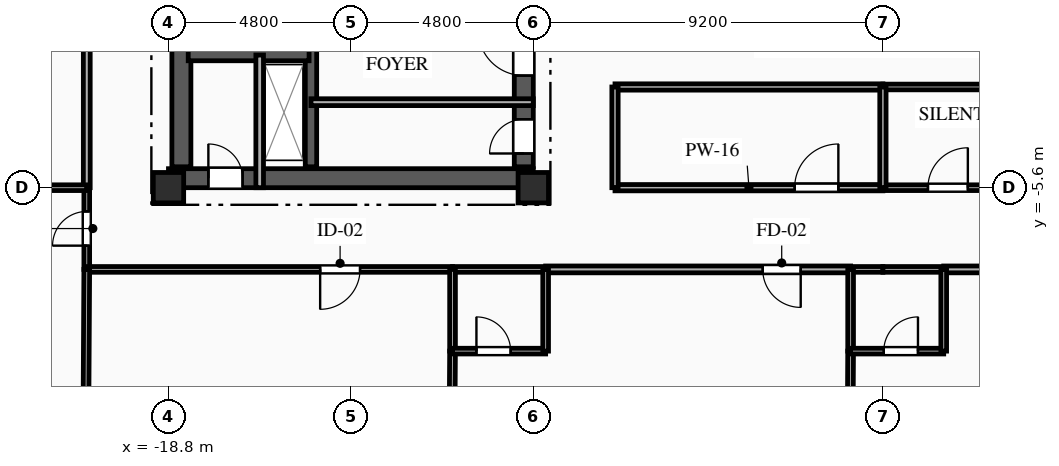
"""IFC4 building model, lengths in metres.
Left out: names, types, materials, properties, quantities, classifications, styles, units other than length and angle.
Written with IfcOpenShell. Run it as: python <this file> out.ifc"""

import sys

from ifc_helpers import new_model, si_unit, direction, frame, frame_2d, origin, origin_2d, place, context, subcontext, project, spatial, rectangle, extrude, element, fill, save


model = new_model("IFC4")
c1 = context("Model", 3, precision=1e-05, world=origin(), true_north=direction((0.0, 1.0)))
c2 = subcontext(c1, "Body", "Model", "MODEL_VIEW")
j1 = project(units=[si_unit("LENGTHUNIT", "METRE"), si_unit("PLANEANGLEUNIT", "RADIAN")], contexts=[c1])
p1 = place(None, origin())
s1 = spatial("IfcSite", under=j1, at=p1, CompositionType="ELEMENT")
p2 = place(p1, origin())
s2 = spatial("IfcBuilding", under=s1, at=p2, CompositionType="ELEMENT")
p3 = place(p2, frame((0.0, 0.0, 189.7)))
s3 = spatial("IfcBuildingStorey", under=s2, at=p3, CompositionType="ELEMENT", Elevation=189.7)
for number, where, z_axis, x_axis in (
    (1, (-18.8, -5.6, 0.0), (0.0, 0.0, 1.0), (1.0, 0.0, 0.0)),
    (2, (-9.2, -5.6, 0.0), (0.0, 0.0, 1.0), (1.0, 0.0, 0.0)),
):
    element("IfcColumn", number, at=place(p3, frame(where, z_axis=z_axis, x_axis=x_axis)), inside=s3, PredefinedType="COLUMN", context=c2, shape_type="SweptSolid", body=[
        extrude(rectangle(XDim=0.8, YDim=0.8, at=origin_2d()), origin(), (0.0, 0.0, 1.0), 3.35),
    ])
p4 = place(p3, frame((-18.8, -5.35, 0.0), z_axis=(0.0, 0.0, 1.0), x_axis=(1.0, 0.0, 0.0)))
e3 = element("IfcWall", 3, at=p4, inside=s3, PredefinedType="SHEAR", context=c2, shape_type="SweptSolid", body=[
    extrude(rectangle(XDim=9.6, YDim=0.5, at=frame_2d((4.8, 0.0))), origin(), (0.0, 0.0, 1.0), 3.04),
])
p5 = place(p4, frame((1.05, 0.0, 0.0)))
e4 = element("IfcOpeningElement", 4, at=p5, cuts=e3, PredefinedType="OPENING", context=c2, shape_type="SweptSolid", body=[
    extrude(rectangle(XDim=0.9, YDim=2.1, at=frame_2d((0.45, 1.05))), frame((0.0, 0.26, 0.0), z_axis=(0.0, -1.0, 0.0), x_axis=(1.0, 0.0, 0.0)), (0.0, 0.0, 1.0), 0.52),
])
p6 = place(p3, frame((-18.46, -5.05, 0.0), z_axis=(0.0, 0.0, 1.0), x_axis=(0.0, 1.0, 0.0)))
e5 = element("IfcWall", 5, at=p6, inside=s3, PredefinedType="SHEAR", context=c2, shape_type="SweptSolid", body=[
    extrude(rectangle(XDim=10.1, YDim=0.5, at=frame_2d((5.05, 0.0))), origin(), (0.0, 0.0, 1.0), 3.04),
])
p7 = place(p3, frame((-9.45, -5.05, 0.0), z_axis=(0.0, 0.0, 1.0), x_axis=(0.0, 1.0, 0.0)))
e6 = element("IfcWall", 6, at=p7, inside=s3, PredefinedType="SHEAR", context=c2, shape_type="SweptSolid", body=[
    extrude(rectangle(XDim=10.1, YDim=0.5, at=frame_2d((5.05, 0.0))), origin(), (0.0, 0.0, 1.0), 3.04),
])
p8 = place(p7, frame((7.175, 0.0, 0.0)))
e7 = element("IfcOpeningElement", 7, at=p8, cuts=e6, PredefinedType="OPENING", context=c2, shape_type="SweptSolid", body=[
    extrude(rectangle(XDim=0.9, YDim=2.1, at=frame_2d((0.45, 1.05))), frame((0.0, 0.26, 0.0), z_axis=(0.0, -1.0, 0.0), x_axis=(1.0, 0.0, 0.0)), (0.0, 0.0, 1.0), 0.52),
])
p9 = place(p7, frame((2.4, 0.0, 0.0)))
e8 = element("IfcOpeningElement", 8, at=p9, cuts=e6, PredefinedType="OPENING", context=c2, shape_type="SweptSolid", body=[
    extrude(rectangle(XDim=1.2, YDim=2.15, at=frame_2d((0.6, 1.075))), frame((0.0, 0.26, 0.0), z_axis=(0.0, -1.0, 0.0), x_axis=(1.0, 0.0, 0.0)), (0.0, 0.0, 1.0), 0.52),
])
p10 = place(p7, frame((0.35, 0.0, 0.0)))
e9 = element("IfcOpeningElement", 9, at=p10, cuts=e6, PredefinedType="OPENING", context=c2, shape_type="SweptSolid", body=[
    extrude(rectangle(XDim=0.9, YDim=2.1, at=frame_2d((0.45, 1.05))), frame((0.0, 0.26, 0.0), z_axis=(0.0, -1.0, 0.0), x_axis=(1.0, 0.0, 0.0)), (0.0, 0.0, 1.0), 0.52),
])
p11 = place(p7, frame((5.0, 0.0, 0.0)))
e10 = element("IfcOpeningElement", 10, at=p11, cuts=e6, PredefinedType="OPENING", context=c2, shape_type="SweptSolid", body=[
    extrude(rectangle(XDim=0.9, YDim=2.1, at=frame_2d((0.45, 1.05))), frame((0.0, 0.26, 0.0), z_axis=(0.0, -1.0, 0.0), x_axis=(1.0, 0.0, 0.0)), (0.0, 0.0, 1.0), 0.52),
])
p12 = place(p3, frame((-15.05, -5.05, 0.0), z_axis=(0.0, 0.0, 1.0), x_axis=(0.0, 1.0, 0.0)))
e11 = element("IfcWall", 11, at=p12, inside=s3, PredefinedType="SHEAR", context=c2, shape_type="SweptSolid", body=[
    extrude(rectangle(XDim=10.1, YDim=0.3, at=frame_2d((5.05, 0.0))), origin(), (0.0, 0.0, 1.0), 3.04),
])
p13 = place(p3, frame((-18.28, -2.11, 0.0), z_axis=(0.0, 0.0, 1.0), x_axis=(1.0, 0.0, 0.0)))
e12 = element("IfcWall", 12, at=p13, inside=s3, PredefinedType="SHEAR", context=c2, shape_type="SweptSolid", body=[
    extrude(rectangle(XDim=3.18, YDim=0.3, at=frame_2d((1.59, 0.0))), origin(), (0.0, 0.0, 1.0), 3.04),
])
p14 = place(p3, frame((-16.4, -5.6, 0.0), z_axis=(0.0, 0.0, 1.0), x_axis=(0.0, 1.0, 0.0)))
e13 = element("IfcWall", 13, at=p14, inside=s3, PredefinedType="PARTITIONING", context=c2, shape_type="SweptSolid", body=[
    extrude(rectangle(XDim=3.49, YDim=0.2, at=frame_2d((1.745, 0.0))), origin(), (0.0, 0.0, 1.0), 3.04),
])
p15 = place(p3, frame((-15.05, -3.35, 0.0), z_axis=(0.0, 0.0, 1.0), x_axis=(1.0, 0.0, 0.0)))
e14 = element("IfcWall", 14, at=p15, inside=s3, PredefinedType="PARTITIONING", context=c2, shape_type="SweptSolid", body=[
    extrude(rectangle(XDim=5.85, YDim=0.18, at=frame_2d((2.925, 0.0))), origin(), (0.0, 0.0, 1.0), 2.755),
])
p16 = place(p3, frame((-20.95, -7.75, 0.0), z_axis=(0.0, 0.0, 1.0), x_axis=(0.0, 1.0, 0.0)))
e15 = element("IfcWall", 15, at=p16, inside=s3, PredefinedType="PARTITIONING", context=c2, shape_type="SweptSolid", body=[
    extrude(rectangle(XDim=2.15, YDim=0.15, at=frame_2d((1.075, 0.0))), origin(), (0.0, 0.0, 1.0), 3.04),
])
p17 = place(p16, frame((0.625, 0.0, 0.0)))
e16 = element("IfcOpeningElement", 16, at=p17, cuts=e15, PredefinedType="OPENING", context=c2, shape_type="SweptSolid", body=[
    extrude(rectangle(XDim=0.9, YDim=2.1, at=frame_2d((0.45, 1.05))), frame((0.0, 0.085, 0.0), z_axis=(0.0, -1.0, 0.0), x_axis=(1.0, 0.0, 0.0)), (0.0, 0.0, 1.0), 0.17),
])
p18 = place(p3, frame((-11.325, -7.75, 0.0), z_axis=(0.0, 0.0, 1.0), x_axis=(-1.0, 0.0, 0.0)))
e17 = element("IfcWall", 17, at=p18, inside=s3, PredefinedType="PARTITIONING", context=c2, shape_type="SweptSolid", body=[
    extrude(rectangle(XDim=9.625, YDim=0.15, at=frame_2d((4.812, 0.0))), origin(), (0.0, 0.0, 1.0), 3.04),
])
p19 = place(p18, frame((2.434, 0.0, 0.0)))
e18 = element("IfcOpeningElement", 18, at=p19, cuts=e17, PredefinedType="OPENING", context=c2, shape_type="SweptSolid", body=[
    extrude(rectangle(XDim=1.05, YDim=2.15, at=frame_2d((0.525, 1.075))), frame((0.0, 0.085, 0.0), z_axis=(0.0, -1.0, 0.0), x_axis=(1.0, 0.0, 0.0)), (0.0, 0.0, 1.0), 0.17),
])
p20 = place(p3, frame((-0.85, -7.75, 0.0), z_axis=(0.0, 0.0, 1.0), x_axis=(-1.0, 0.0, 0.0)))
e19 = element("IfcWall", 19, at=p20, inside=s3, PredefinedType="PARTITIONING", context=c2, shape_type="SweptSolid", body=[
    extrude(rectangle(XDim=8.025, YDim=0.18, at=frame_2d((4.012, 0.0))), origin(), (0.0, 0.0, 1.0), 3.04),
])
p21 = place(p20, frame((1.313, 0.0, 0.0)))
e20 = element("IfcOpeningElement", 20, at=p21, cuts=e19, PredefinedType="OPENING", context=c2, shape_type="SweptSolid", body=[
    extrude(rectangle(XDim=1.0, YDim=2.15, at=frame_2d((0.5, 1.075))), frame((0.0, 0.1, 0.0), z_axis=(0.0, -1.0, 0.0), x_axis=(1.0, 0.0, 0.0)), (0.0, 0.0, 1.0), 0.2),
])
p22 = place(p3, frame((-8.875, -7.75, 0.0), z_axis=(0.0, 0.0, 1.0), x_axis=(-1.0, 0.0, 0.0)))
e21 = element("IfcWall", 21, at=p22, inside=s3, PredefinedType="PLUMBINGWALL", context=c2, shape_type="SweptSolid", body=[
    extrude(rectangle(XDim=2.45, YDim=0.15, at=frame_2d((1.225, 0.0))), origin(), (0.0, 0.0, 1.0), 3.04),
])
p23 = place(p3, frame((0.0, -7.75, 0.0), z_axis=(0.0, 0.0, 1.0), x_axis=(-1.0, 0.0, 0.0)))
e22 = element("IfcWall", 22, at=p23, inside=s3, PredefinedType="PLUMBINGWALL", context=c2, shape_type="SweptSolid", body=[
    extrude(rectangle(XDim=0.85, YDim=0.15, at=frame_2d((0.425, 0.0))), origin(), (0.0, 0.0, 1.0), 3.04),
])
p24 = place(p3, frame((-7.05, -5.6, 0.0), z_axis=(0.0, 0.0, 1.0), x_axis=(1.0, 0.0, 0.0)))
e23 = element("IfcWall", 23, at=p24, inside=s3, PredefinedType="PARTITIONING", context=c2, shape_type="SweptSolid", body=[
    extrude(rectangle(XDim=7.05, YDim=0.165, at=frame_2d((3.525, 0.0))), origin(), (0.0, 0.0, 1.0), 2.525),
])
p25 = place(p24, frame((4.728, 0.0, 0.0)))
e24 = element("IfcOpeningElement", 24, at=p25, cuts=e23, PredefinedType="OPENING", context=c2, shape_type="SweptSolid", body=[
    extrude(rectangle(XDim=1.15, YDim=2.15, at=frame_2d((0.575, 1.075))), frame((0.0, 0.093, 0.0), z_axis=(0.0, -1.0, 0.0), x_axis=(1.0, 0.0, 0.0)), (0.0, 0.0, 1.0), 0.185),
])
p26 = place(p3, frame((9.625, -7.75, 0.0), z_axis=(0.0, 0.0, 1.0), x_axis=(-1.0, 0.0, 0.0)))
e25 = element("IfcWall", 25, at=p26, inside=s3, PredefinedType="PARTITIONING", context=c2, shape_type="SweptSolid", body=[
    extrude(rectangle(XDim=8.025, YDim=0.18, at=frame_2d((4.012, 0.0))), origin(), (0.0, 0.0, 1.0), 3.04),
])
p27 = place(p26, frame((5.712, 0.0, 0.0)))
e26 = element("IfcOpeningElement", 26, at=p27, cuts=e25, PredefinedType="OPENING", context=c2, shape_type="SweptSolid", body=[
    extrude(rectangle(XDim=1.0, YDim=2.15, at=frame_2d((0.5, 1.075))), frame((0.0, 0.1, 0.0), z_axis=(0.0, -1.0, 0.0), x_axis=(1.0, 0.0, 0.0)), (0.0, 0.0, 1.0), 0.2),
])
p28 = place(p3, frame((1.6, -7.75, 0.0), z_axis=(0.0, 0.0, 1.0), x_axis=(-1.0, 0.0, 0.0)))
e27 = element("IfcWall", 27, at=p28, inside=s3, PredefinedType="PLUMBINGWALL", context=c2, shape_type="SweptSolid", body=[
    extrude(rectangle(XDim=1.6, YDim=0.15, at=frame_2d((0.8, 0.0))), origin(), (0.0, 0.0, 1.0), 3.04),
])
p29 = place(p3, frame((0.0, -5.6, 0.0), z_axis=(0.0, 0.0, 1.0), x_axis=(1.0, 0.0, 0.0)))
e28 = element("IfcWall", 28, at=p29, inside=s3, PredefinedType="PARTITIONING", context=c2, shape_type="SweptSolid", body=[
    extrude(rectangle(XDim=7.05, YDim=0.15, at=frame_2d((3.525, 0.0))), origin(), (0.0, 0.0, 1.0), 2.525),
])
p30 = place(p29, frame((1.185, 0.0, 0.0)))
e29 = element("IfcOpeningElement", 29, at=p30, cuts=e28, PredefinedType="OPENING", context=c2, shape_type="SweptSolid", body=[
    extrude(rectangle(XDim=1.05, YDim=2.15, at=frame_2d((0.525, 1.075))), frame((0.0, 0.085, 0.0), z_axis=(0.0, -1.0, 0.0), x_axis=(1.0, 0.0, 0.0)), (0.0, 0.0, 1.0), 0.17),
])
p31 = place(p3, frame((-20.95, -5.6, 0.0), z_axis=(0.0, 0.0, 1.0), x_axis=(0.0, 1.0, 0.0)))
e30 = element("IfcWall", 30, at=p31, inside=s3, PredefinedType="PARTITIONING", context=c2, shape_type="SweptSolid", body=[
    extrude(rectangle(XDim=14.1, YDim=0.18, at=frame_2d((7.05, 0.0))), origin(), (0.0, 0.0, 1.0), 3.04),
])
p32 = place(p31, frame((5.058, 0.0, 0.0)))
e31 = element("IfcOpeningElement", 31, at=p32, cuts=e30, PredefinedType="OPENING", context=c2, shape_type="SweptSolid", body=[
    extrude(rectangle(XDim=1.0, YDim=2.15, at=frame_2d((0.5, 1.075))), frame((0.0, 0.1, 0.0), z_axis=(0.0, -1.0, 0.0), x_axis=(1.0, 0.0, 0.0)), (0.0, 0.0, 1.0), 0.2),
])
p33 = place(p3, frame((0.0, -2.95, 0.0), z_axis=(0.0, 0.0, 1.0), x_axis=(-1.0, 0.0, 0.0)))
e32 = element("IfcWall", 32, at=p33, inside=s3, PredefinedType="PARTITIONING", context=c2, shape_type="SweptSolid", body=[
    extrude(rectangle(XDim=7.05, YDim=0.165, at=frame_2d((3.525, 0.0))), origin(), (0.0, 0.0, 1.0), 3.04),
])
p34 = place(p3, frame((7.05, -2.95, 0.0), z_axis=(0.0, 0.0, 1.0), x_axis=(-1.0, 0.0, 0.0)))
e33 = element("IfcWall", 33, at=p34, inside=s3, PredefinedType="PARTITIONING", context=c2, shape_type="SweptSolid", body=[
    extrude(rectangle(XDim=7.05, YDim=0.15, at=frame_2d((3.525, 0.0))), origin(), (0.0, 0.0, 1.0), 3.04),
])
p35 = place(p3, frame((-7.05, -2.95, 0.0), z_axis=(0.0, 0.0, 1.0), x_axis=(0.0, -1.0, 0.0)))
e34 = element("IfcWall", 34, at=p35, inside=s3, PredefinedType="PARTITIONING", context=c2, shape_type="SweptSolid", body=[
    extrude(rectangle(XDim=2.65, YDim=0.165, at=frame_2d((1.325, 0.0))), origin(), (0.0, 0.0, 1.0), 3.04),
])
p36 = place(p3, frame((-20.95, -5.6, 0.0), z_axis=(0.0, 0.0, 1.0), x_axis=(-1.0, 0.0, 0.0)))
e35 = element("IfcWall", 35, at=p36, inside=s3, PredefinedType="PARTITIONING", context=c2, shape_type="SweptSolid", body=[
    extrude(rectangle(XDim=2.65, YDim=0.15, at=frame_2d((1.325, 0.0))), origin(), (0.0, 0.0, 1.0), 3.04),
])
p37 = place(p36, frame((0.965, 0.0, 0.0)))
e36 = element("IfcOpeningElement", 36, at=p37, cuts=e35, PredefinedType="OPENING", context=c2, shape_type="SweptSolid", body=[
    extrude(rectangle(XDim=1.05, YDim=2.15, at=frame_2d((0.525, 1.075))), frame((0.0, 0.085, 0.0), z_axis=(0.0, -1.0, 0.0), x_axis=(1.0, 0.0, 0.0)), (0.0, 0.0, 1.0), 0.17),
])
p38 = place(p3, frame((-20.95, -7.75, 0.0), z_axis=(0.0, 0.0, 1.0), x_axis=(-0.005804668564, -0.99998315277, 0.0)))
e37 = element("IfcWall", 37, at=p38, inside=s3, PredefinedType="PARTITIONING", context=c2, shape_type="SweptSolid", body=[
    extrude(rectangle(XDim=7.571, YDim=0.15, at=frame_2d((3.785, 0.0))), origin(), (0.0, 0.0, 1.0), 3.04),
])
p39 = place(p3, frame((-11.325, -9.9, 0.0), z_axis=(0.0, 0.0, 1.0), x_axis=(-0.006831737937, -0.999976663406, 0.0)))
e38 = element("IfcWall", 38, at=p39, inside=s3, PredefinedType="PARTITIONING", context=c2, shape_type="SweptSolid", body=[
    extrude(rectangle(XDim=6.433, YDim=0.15, at=frame_2d((3.216, 0.0))), origin(), (0.0, 0.0, 1.0), 2.665),
])
p40 = place(p3, frame((-11.325, -7.75, 0.0), z_axis=(0.0, 0.0, 1.0), x_axis=(0.0, -1.0, 0.0)))
e39 = element("IfcWall", 39, at=p40, inside=s3, PredefinedType="PLUMBINGWALL", context=c2, shape_type="SweptSolid", body=[
    extrude(rectangle(XDim=2.15, YDim=0.15, at=frame_2d((1.075, 0.0))), origin(), (0.0, 0.0, 1.0), 3.04),
])
p41 = place(p3, frame((-11.325, -9.9, 0.0), z_axis=(0.0, 0.0, 1.0), x_axis=(1.0, 0.0, 0.0)))
e40 = element("IfcWall", 40, at=p41, inside=s3, PredefinedType="PLUMBINGWALL", context=c2, shape_type="SweptSolid", body=[
    extrude(rectangle(XDim=2.45, YDim=0.15, at=frame_2d((1.225, 0.0))), origin(), (0.0, 0.0, 1.0), 3.04),
])
p42 = place(p41, frame((0.629, 0.0, 0.0)))
e41 = element("IfcOpeningElement", 41, at=p42, cuts=e40, PredefinedType="OPENING", context=c2, shape_type="SweptSolid", body=[
    extrude(rectangle(XDim=0.9, YDim=2.1, at=frame_2d((0.45, 1.05))), frame((0.0, 0.085, 0.0), z_axis=(0.0, -1.0, 0.0), x_axis=(1.0, 0.0, 0.0)), (0.0, 0.0, 1.0), 0.17),
])
p43 = place(p3, frame((-8.875, -9.9, 0.0), z_axis=(0.0, 0.0, 1.0), x_axis=(0.0, 1.0, 0.0)))
e42 = element("IfcWall", 42, at=p43, inside=s3, PredefinedType="PLUMBINGWALL", context=c2, shape_type="SweptSolid", body=[
    extrude(rectangle(XDim=2.15, YDim=0.15, at=frame_2d((1.075, 0.0))), origin(), (0.0, 0.0, 1.0), 3.04),
])
p44 = place(p3, frame((-0.85, -9.9, 0.0), z_axis=(0.0, 0.0, 1.0), x_axis=(-0.005801043172, -0.999983173807, 0.0)))
e43 = element("IfcWall", 43, at=p44, inside=s3, PredefinedType="PARTITIONING", context=c2, shape_type="SweptSolid", body=[
    extrude(rectangle(XDim=7.533, YDim=0.15, at=frame_2d((3.767, 0.0))), origin(), (0.0, 0.0, 1.0), 3.04),
])
p45 = place(p3, frame((-0.85, -7.75, 0.0), z_axis=(0.0, 0.0, 1.0), x_axis=(0.0, -1.0, 0.0)))
e44 = element("IfcWall", 44, at=p45, inside=s3, PredefinedType="PLUMBINGWALL", context=c2, shape_type="SweptSolid", body=[
    extrude(rectangle(XDim=2.15, YDim=0.15, at=frame_2d((1.075, 0.0))), origin(), (0.0, 0.0, 1.0), 3.04),
])
p46 = place(p3, frame((-0.85, -9.9, 0.0), z_axis=(0.0, 0.0, 1.0), x_axis=(1.0, 0.0, 0.0)))
e45 = element("IfcWall", 45, at=p46, inside=s3, PredefinedType="PLUMBINGWALL", context=c2, shape_type="SweptSolid", body=[
    extrude(rectangle(XDim=2.45, YDim=0.15, at=frame_2d((1.225, 0.0))), origin(), (0.0, 0.0, 1.0), 3.04),
])
p47 = place(p46, frame((0.873, 0.0, 0.0)))
e46 = element("IfcOpeningElement", 46, at=p47, cuts=e45, PredefinedType="OPENING", context=c2, shape_type="SweptSolid", body=[
    extrude(rectangle(XDim=0.9, YDim=2.1, at=frame_2d((0.45, 1.05))), frame((0.0, 0.085, 0.0), z_axis=(0.0, -1.0, 0.0), x_axis=(1.0, 0.0, 0.0)), (0.0, 0.0, 1.0), 0.17),
])
p48 = place(p3, frame((1.6, -9.9, 0.0), z_axis=(0.0, 0.0, 1.0), x_axis=(0.0, 1.0, 0.0)))
e47 = element("IfcWall", 47, at=p48, inside=s3, PredefinedType="PLUMBINGWALL", context=c2, shape_type="SweptSolid", body=[
    extrude(rectangle(XDim=2.15, YDim=0.15, at=frame_2d((1.075, 0.0))), origin(), (0.0, 0.0, 1.0), 3.04),
])
p49 = place(p3, frame((0.0, -2.95, 0.0), z_axis=(0.0, 0.0, 1.0), x_axis=(0.0, -1.0, 0.0)))
e48 = element("IfcWall", 48, at=p49, inside=s3, PredefinedType="PARTITIONING", context=c2, shape_type="SweptSolid", body=[
    extrude(rectangle(XDim=2.65, YDim=0.165, at=frame_2d((1.325, 0.0))), origin(), (0.0, 0.0, 1.0), 3.04),
])
p50 = place(p5, origin())
e49 = element("IfcDoor", 49, at=p50, inside=s3, OperationType="SINGLE_SWING_LEFT", PredefinedType="DOOR", context=c2, shape_type="SweptSolid", body=[
    extrude(rectangle(XDim=0.9, YDim=2.1, at=frame_2d((0.45, 1.05))), frame((0.0, 0.025, 0.0), z_axis=(0.0, -1.0, 0.0), x_axis=(1.0, 0.0, 0.0)), (0.0, 0.0, 1.0), 0.05),
])
fill(e4, e49)
p51 = place(p9, origin())
e50 = element("IfcDoor", 50, at=p51, inside=s3, OperationType="SINGLE_SWING_RIGHT", PredefinedType="DOOR", context=c2, shape_type="SweptSolid", body=[
    extrude(rectangle(XDim=1.2, YDim=2.15, at=frame_2d((0.6, 1.075))), frame((0.0, 0.025, 0.0), z_axis=(0.0, -1.0, 0.0), x_axis=(1.0, 0.0, 0.0)), (0.0, 0.0, 1.0), 0.05),
])
fill(e8, e50)
p52 = place(p10, origin())
e51 = element("IfcDoor", 51, at=p52, inside=s3, OperationType="SINGLE_SWING_LEFT", PredefinedType="DOOR", context=c2, shape_type="SweptSolid", body=[
    extrude(rectangle(XDim=0.9, YDim=2.1, at=frame_2d((0.45, 1.05))), frame((0.0, 0.025, 0.0), z_axis=(0.0, -1.0, 0.0), x_axis=(1.0, 0.0, 0.0)), (0.0, 0.0, 1.0), 0.05),
])
fill(e9, e51)
p53 = place(p17, origin())
e52 = element("IfcDoor", 52, at=p53, inside=s3, OperationType="SINGLE_SWING_LEFT", PredefinedType="DOOR", context=c2, shape_type="SweptSolid", body=[
    extrude(rectangle(XDim=0.9, YDim=2.1, at=frame_2d((0.45, 1.05))), frame((0.0, 0.025, 0.0), z_axis=(0.0, -1.0, 0.0), x_axis=(1.0, 0.0, 0.0)), (0.0, 0.0, 1.0), 0.05),
])
fill(e16, e52)
p54 = place(p19, origin())
e53 = element("IfcDoor", 53, at=p54, inside=s3, OperationType="SINGLE_SWING_RIGHT", PredefinedType="DOOR", context=c2, shape_type="SweptSolid", body=[
    extrude(rectangle(XDim=1.05, YDim=2.15, at=frame_2d((0.525, 1.075))), frame((0.0, 0.025, 0.0), z_axis=(0.0, -1.0, 0.0), x_axis=(1.0, 0.0, 0.0)), (0.0, 0.0, 1.0), 0.05),
])
fill(e18, e53)
p55 = place(p21, origin())
e54 = element("IfcDoor", 54, at=p55, inside=s3, OperationType="SINGLE_SWING_LEFT", PredefinedType="DOOR", context=c2, shape_type="SweptSolid", body=[
    extrude(rectangle(XDim=1.0, YDim=2.15, at=frame_2d((0.5, 1.075))), frame((0.0, 0.025, 0.0), z_axis=(0.0, -1.0, 0.0), x_axis=(1.0, 0.0, 0.0)), (0.0, 0.0, 1.0), 0.05),
])
fill(e20, e54)
p56 = place(p25, origin())
e55 = element("IfcDoor", 55, at=p56, inside=s3, OperationType="SINGLE_SWING_RIGHT", PredefinedType="DOOR", context=c2, shape_type="SweptSolid", body=[
    extrude(rectangle(XDim=1.15, YDim=2.15, at=frame_2d((0.575, 1.075))), frame((0.0, 0.025, 0.0), z_axis=(0.0, -1.0, 0.0), x_axis=(1.0, 0.0, 0.0)), (0.0, 0.0, 1.0), 0.05),
])
fill(e24, e55)
p57 = place(p30, origin())
e56 = element("IfcDoor", 56, at=p57, inside=s3, OperationType="SINGLE_SWING_RIGHT", PredefinedType="DOOR", context=c2, shape_type="SweptSolid", body=[
    extrude(rectangle(XDim=1.05, YDim=2.15, at=frame_2d((0.525, 1.075))), frame((0.0, 0.025, 0.0), z_axis=(0.0, -1.0, 0.0), x_axis=(1.0, 0.0, 0.0)), (0.0, 0.0, 1.0), 0.05),
])
fill(e29, e56)
p58 = place(p42, origin())
e57 = element("IfcDoor", 57, at=p58, inside=s3, OperationType="SINGLE_SWING_LEFT", PredefinedType="DOOR", context=c2, shape_type="SweptSolid", body=[
    extrude(rectangle(XDim=0.9, YDim=2.1, at=frame_2d((0.45, 1.05))), frame((0.0, 0.025, 0.0), z_axis=(0.0, -1.0, 0.0), x_axis=(1.0, 0.0, 0.0)), (0.0, 0.0, 1.0), 0.05),
])
fill(e41, e57)
p59 = place(p47, origin())
e58 = element("IfcDoor", 58, at=p59, inside=s3, OperationType="SINGLE_SWING_RIGHT", PredefinedType="DOOR", context=c2, shape_type="SweptSolid", body=[
    extrude(rectangle(XDim=0.9, YDim=2.1, at=frame_2d((0.45, 1.05))), frame((0.0, 0.025, 0.0), z_axis=(0.0, -1.0, 0.0), x_axis=(1.0, 0.0, 0.0)), (0.0, 0.0, 1.0), 0.05),
])
fill(e46, e58)
save(model, sys.argv[1])
